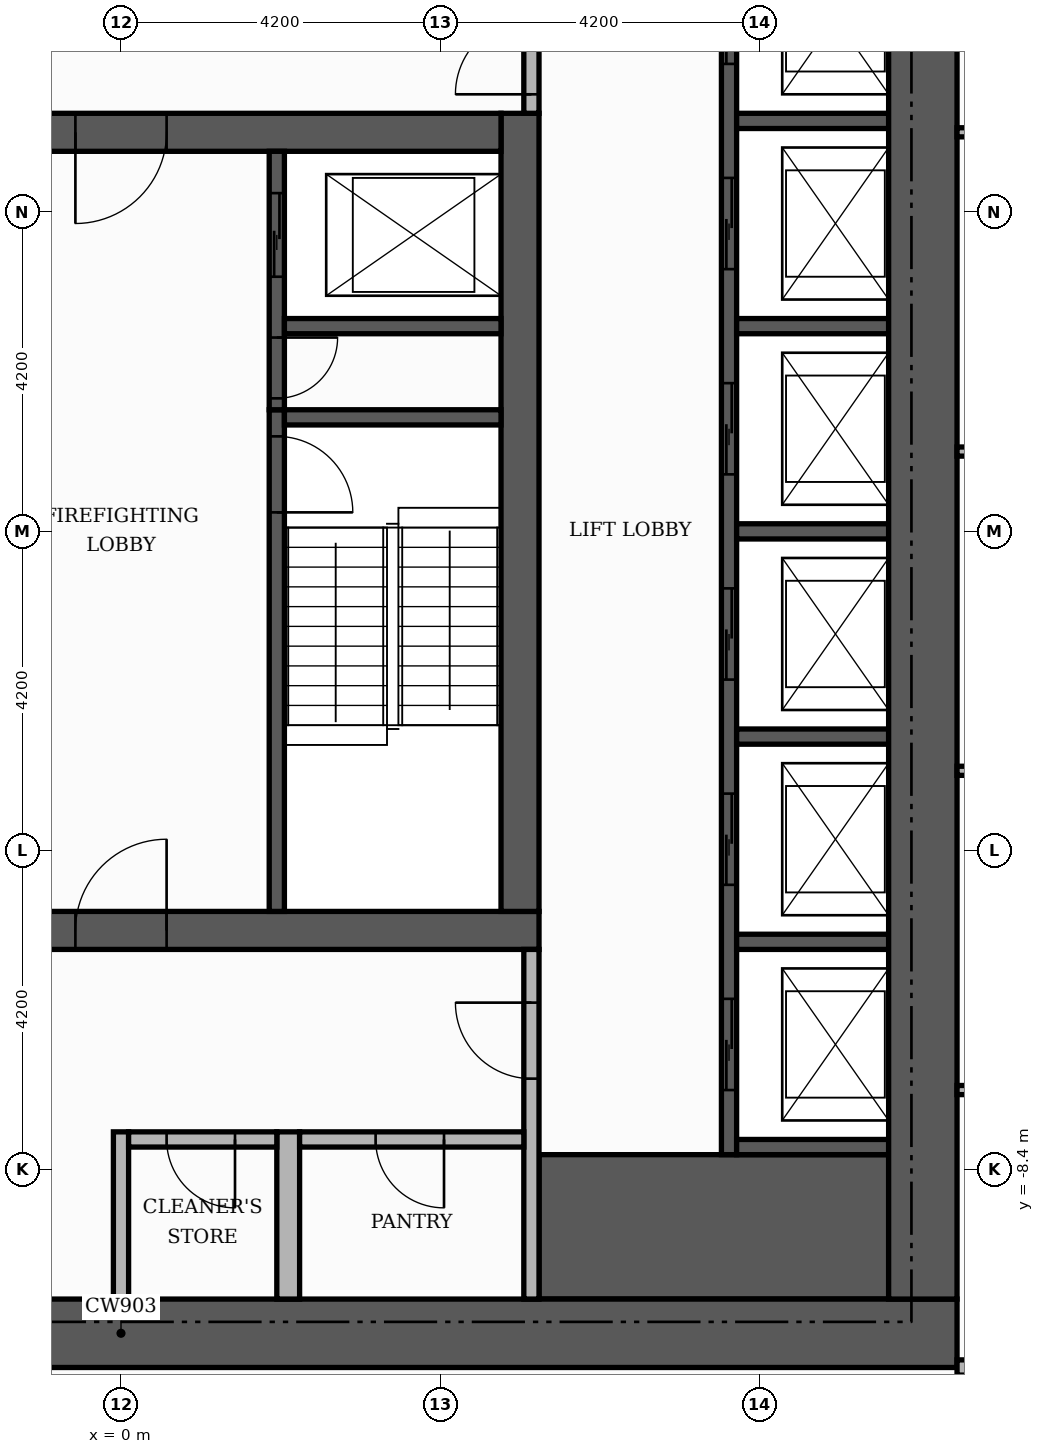
"""IFC4 building model, lengths in metres.
Left out: names, types, materials, properties, quantities, classifications, styles, units other than length and angle.
Written with IfcOpenShell. Run it as: python <this file> out.ifc"""

import sys

from ifc_helpers import new_model, si_unit, direction, frame, frame_2d, origin, place, context, subcontext, project, spatial, rectangle, extrude, element, fill, save


model = new_model("IFC4")
c1 = context("Model", 3, precision=1e-05, world=origin(), true_north=direction((0.0, 1.0)))
c2 = subcontext(c1, "Body", "Model", "MODEL_VIEW")
j1 = project(units=[si_unit("LENGTHUNIT", "METRE"), si_unit("PLANEANGLEUNIT", "RADIAN")], contexts=[c1])
p1 = place(None, origin())
s1 = spatial("IfcSite", under=j1, at=p1, CompositionType="ELEMENT")
p2 = place(p1, origin())
s2 = spatial("IfcBuilding", under=s1, at=p2, CompositionType="ELEMENT")
p3 = place(p2, frame((0.0, 0.0, 145.5)))
s3 = spatial("IfcBuildingStorey", under=s2, at=p3, CompositionType="ELEMENT", Elevation=145.5)
p4 = place(p3, frame((-5.5, -5.25, 0.0), z_axis=(0.0, 0.0, 1.0), x_axis=(1.0, 0.0, 0.0)))
e1 = element("IfcWall", 1, at=p4, inside=s3, PredefinedType="SHEAR", context=c2, shape_type="SweptSolid", body=[
    extrude(rectangle(XDim=11.0, YDim=0.5, at=frame_2d((5.5, 0.0))), origin(), (0.0, 0.0, 1.0), 3.48),
])
p5 = place(p4, frame((4.9, 0.0, 0.0)))
e2 = element("IfcOpeningElement", 2, at=p5, cuts=e1, PredefinedType="OPENING", context=c2, shape_type="SweptSolid", body=[
    extrude(rectangle(XDim=1.2, YDim=2.1, at=frame_2d((0.6, 1.05))), frame((0.0, 0.26, 0.0), z_axis=(0.0, -1.0, 0.0), x_axis=(1.0, 0.0, 0.0)), (0.0, 0.0, 1.0), 0.52),
])
p6 = place(p3, frame((5.25, -5.0, 0.0), z_axis=(0.0, 0.0, 1.0), x_axis=(0.0, 1.0, 0.0)))
e3 = element("IfcWall", 3, at=p6, inside=s3, PredefinedType="SHEAR", context=c2, shape_type="SweptSolid", body=[
    extrude(rectangle(XDim=10.5, YDim=0.5, at=frame_2d((5.25, 0.0))), origin(), (0.0, 0.0, 1.0), 3.48),
])
p7 = place(p3, frame((-5.0, 5.25, 0.0), z_axis=(0.0, 0.0, 1.0), x_axis=(1.0, 0.0, 0.0)))
e4 = element("IfcWall", 4, at=p7, inside=s3, PredefinedType="SHEAR", context=c2, shape_type="SweptSolid", body=[
    extrude(rectangle(XDim=10.0, YDim=0.5, at=frame_2d((5.0, 0.0))), origin(), (0.0, 0.0, 1.0), 3.48),
])
p8 = place(p7, frame((4.4, 0.0, 0.0)))
e5 = element("IfcOpeningElement", 5, at=p8, cuts=e4, PredefinedType="OPENING", context=c2, shape_type="SweptSolid", body=[
    extrude(rectangle(XDim=1.2, YDim=2.1, at=frame_2d((0.6, 1.05))), frame((0.0, 0.26, 0.0), z_axis=(0.0, -1.0, 0.0), x_axis=(1.0, 0.0, 0.0)), (0.0, 0.0, 1.0), 0.52),
])
p9 = place(p3, frame((5.5, -9.15, 0.0), z_axis=(0.0, 0.0, 1.0), x_axis=(1.0, 0.0, 0.0)))
e6 = element("IfcWall", 6, at=p9, inside=s3, PredefinedType="SHEAR", context=c2, shape_type="SweptSolid", body=[
    extrude(rectangle(XDim=4.6, YDim=1.9, at=frame_2d((2.3, 0.0))), origin(), (0.0, 0.0, 1.0), 3.48),
])
p10 = place(p3, frame((2.05, -5.0, 0.0), z_axis=(0.0, 0.0, 1.0), x_axis=(0.0, 1.0, 0.0)))
e7 = element("IfcWall", 7, at=p10, inside=s3, PredefinedType="SHEAR", context=c2, shape_type="SweptSolid", body=[
    extrude(rectangle(XDim=6.6, YDim=0.2, at=frame_2d((3.3, 0.0))), origin(), (0.0, 0.0, 1.0), 3.48),
])
p11 = place(p10, frame((5.25, 0.0, 0.0)))
e8 = element("IfcOpeningElement", 8, at=p11, cuts=e7, PredefinedType="OPENING", context=c2, shape_type="SweptSolid", body=[
    extrude(rectangle(XDim=1.0, YDim=2.1, at=frame_2d((0.5, 1.05))), frame((0.0, 0.11, 0.0), z_axis=(0.0, -1.0, 0.0), x_axis=(1.0, 0.0, 0.0)), (0.0, 0.0, 1.0), 0.22),
])
p12 = place(p3, frame((2.15, 1.5, 0.0), z_axis=(0.0, 0.0, 1.0), x_axis=(1.0, 0.0, 0.0)))
e9 = element("IfcWall", 9, at=p12, inside=s3, PredefinedType="SHEAR", context=c2, shape_type="SweptSolid", body=[
    extrude(rectangle(XDim=2.85, YDim=0.2, at=frame_2d((1.425, 0.0))), origin(), (0.0, 0.0, 1.0), 3.48),
])
p13 = place(p3, frame((8.0, -8.2, 0.0), z_axis=(0.0, 0.0, 1.0), x_axis=(0.0, 1.0, 0.0)))
e10 = element("IfcWall", 10, at=p13, inside=s3, PredefinedType="SHEAR", context=c2, shape_type="SweptSolid", body=[
    extrude(rectangle(XDim=16.4, YDim=0.2, at=frame_2d((8.2, 0.0))), origin(), (0.0, 0.0, 1.0), 3.48),
])
p14 = place(p13, frame((0.85, 0.0, 0.0)))
e11 = element("IfcOpeningElement", 11, at=p14, cuts=e10, PredefinedType="OPENING", context=c2, shape_type="SweptSolid", body=[
    extrude(rectangle(XDim=1.2, YDim=2.1, at=frame_2d((0.6, 1.05))), frame((0.0, 0.11, 0.0), z_axis=(0.0, -1.0, 0.0), x_axis=(1.0, 0.0, 0.0)), (0.0, 0.0, 1.0), 0.22),
])
p15 = place(p13, frame((3.55, 0.0, 0.0)))
e12 = element("IfcOpeningElement", 12, at=p15, cuts=e10, PredefinedType="OPENING", context=c2, shape_type="SweptSolid", body=[
    extrude(rectangle(XDim=1.2, YDim=2.1, at=frame_2d((0.6, 1.05))), frame((0.0, 0.11, 0.0), z_axis=(0.0, -1.0, 0.0), x_axis=(1.0, 0.0, 0.0)), (0.0, 0.0, 1.0), 0.22),
])
p16 = place(p13, frame((6.25, 0.0, 0.0)))
e13 = element("IfcOpeningElement", 13, at=p16, cuts=e10, PredefinedType="OPENING", context=c2, shape_type="SweptSolid", body=[
    extrude(rectangle(XDim=1.2, YDim=2.1, at=frame_2d((0.6, 1.05))), frame((0.0, 0.11, 0.0), z_axis=(0.0, -1.0, 0.0), x_axis=(1.0, 0.0, 0.0)), (0.0, 0.0, 1.0), 0.22),
])
p17 = place(p13, frame((8.95, 0.0, 0.0)))
e14 = element("IfcOpeningElement", 14, at=p17, cuts=e10, PredefinedType="OPENING", context=c2, shape_type="SweptSolid", body=[
    extrude(rectangle(XDim=1.2, YDim=2.1, at=frame_2d((0.6, 1.05))), frame((0.0, 0.11, 0.0), z_axis=(0.0, -1.0, 0.0), x_axis=(1.0, 0.0, 0.0)), (0.0, 0.0, 1.0), 0.22),
])
p18 = place(p13, frame((11.65, 0.0, 0.0)))
e15 = element("IfcOpeningElement", 15, at=p18, cuts=e10, PredefinedType="OPENING", context=c2, shape_type="SweptSolid", body=[
    extrude(rectangle(XDim=1.2, YDim=2.1, at=frame_2d((0.6, 1.05))), frame((0.0, 0.11, 0.0), z_axis=(0.0, -1.0, 0.0), x_axis=(1.0, 0.0, 0.0)), (0.0, 0.0, 1.0), 0.22),
])
p19 = place(p13, frame((14.35, 0.0, 0.0)))
e16 = element("IfcOpeningElement", 16, at=p19, cuts=e10, PredefinedType="OPENING", context=c2, shape_type="SweptSolid", body=[
    extrude(rectangle(XDim=1.2, YDim=2.1, at=frame_2d((0.6, 1.05))), frame((0.0, 0.11, 0.0), z_axis=(0.0, -1.0, 0.0), x_axis=(1.0, 0.0, 0.0)), (0.0, 0.0, 1.0), 0.22),
])
for number, where, z_axis, x_axis in (
    (17, (8.1, -8.1, 0.0), (0.0, 0.0, 1.0), (1.0, 0.0, 0.0)),
    (18, (8.1, -5.4, 0.0), (0.0, 0.0, 1.0), (1.0, 0.0, 0.0)),
    (19, (8.1, -2.7, 0.0), (0.0, 0.0, 1.0), (1.0, 0.0, 0.0)),
    (20, (8.1, 0.0, 0.0), (0.0, 0.0, 1.0), (1.0, 0.0, 0.0)),
):
    element("IfcWall", number, at=place(p3, frame(where, z_axis=z_axis, x_axis=x_axis)), inside=s3, PredefinedType="SHEAR", context=c2, shape_type="SweptSolid", body=[
        extrude(rectangle(XDim=2.0, YDim=0.2, at=frame_2d((1.0, 0.0))), origin(), (0.0, 0.0, 1.0), 3.48),
    ])
p20 = place(p3, frame((2.05, 1.6, 0.0), z_axis=(0.0, 0.0, 1.0), x_axis=(0.0, 1.0, 0.0)))
e21 = element("IfcWall", 21, at=p20, inside=s3, PredefinedType="SHEAR", context=c2, shape_type="SweptSolid", body=[
    extrude(rectangle(XDim=3.4, YDim=0.2, at=frame_2d((1.7, 0.0))), origin(), (0.0, 0.0, 1.0), 3.48),
])
p21 = place(p20, frame((1.75, 0.0, 0.0)))
e22 = element("IfcOpeningElement", 22, at=p21, cuts=e21, PredefinedType="OPENING", context=c2, shape_type="SweptSolid", body=[
    extrude(rectangle(XDim=1.1, YDim=2.1, at=frame_2d((0.55, 1.05))), frame((0.0, 0.11, 0.0), z_axis=(0.0, -1.0, 0.0), x_axis=(1.0, 0.0, 0.0)), (0.0, 0.0, 1.0), 0.22),
])
p22 = place(p20, frame((0.15, 0.0, 0.0)))
e23 = element("IfcOpeningElement", 23, at=p22, cuts=e21, PredefinedType="OPENING", context=c2, shape_type="SweptSolid", body=[
    extrude(rectangle(XDim=0.8, YDim=2.1, at=frame_2d((0.4, 1.05))), frame((0.0, 0.11, 0.0), z_axis=(0.0, -1.0, 0.0), x_axis=(1.0, 0.0, 0.0)), (0.0, 0.0, 1.0), 0.22),
])
p23 = place(p3, frame((2.15, 2.7, 0.0), z_axis=(0.0, 0.0, 1.0), x_axis=(1.0, 0.0, 0.0)))
e24 = element("IfcWall", 24, at=p23, inside=s3, PredefinedType="SHEAR", context=c2, shape_type="SweptSolid", body=[
    extrude(rectangle(XDim=2.85, YDim=0.2, at=frame_2d((1.425, 0.0))), origin(), (0.0, 0.0, 1.0), 3.48),
])
for number, where, z_axis, x_axis in (
    (25, (8.1, 2.7, 0.0), (0.0, 0.0, 1.0), (1.0, 0.0, 0.0)),
    (26, (8.1, 5.4, 0.0), (0.0, 0.0, 1.0), (1.0, 0.0, 0.0)),
):
    element("IfcWall", number, at=place(p3, frame(where, z_axis=z_axis, x_axis=x_axis)), inside=s3, PredefinedType="SHEAR", context=c2, shape_type="SweptSolid", body=[
        extrude(rectangle(XDim=2.0, YDim=0.2, at=frame_2d((1.0, 0.0))), origin(), (0.0, 0.0, 1.0), 3.48),
    ])
p24 = place(p3, frame((-11.0, -10.55, 0.0), z_axis=(0.0, 0.0, 1.0), x_axis=(1.0, 0.0, 0.0)))
e27 = element("IfcWall", 27, at=p24, inside=s3, PredefinedType="SHEAR", context=c2, shape_type="SweptSolid", body=[
    extrude(rectangle(XDim=22.0, YDim=0.9, at=frame_2d((11.0, 0.0))), origin(), (0.0, 0.0, 1.0), 3.48),
])
p25 = place(p24, frame((7.4, 0.0, 0.0)))
e28 = element("IfcOpeningElement", 28, at=p25, cuts=e27, PredefinedType="OPENING", context=c2, shape_type="SweptSolid", body=[
    extrude(rectangle(XDim=1.8, YDim=2.2, at=frame_2d((0.9, 1.1))), frame((0.0, 0.46, 0.0), z_axis=(0.0, -1.0, 0.0), x_axis=(1.0, 0.0, 0.0)), (0.0, 0.0, 1.0), 0.92),
])
p26 = place(p3, frame((10.55, -10.1, 0.0), z_axis=(0.0, 0.0, 1.0), x_axis=(0.0, 1.0, 0.0)))
e29 = element("IfcWall", 29, at=p26, inside=s3, PredefinedType="SHEAR", context=c2, shape_type="SweptSolid", body=[
    extrude(rectangle(XDim=20.2, YDim=0.9, at=frame_2d((10.1, 0.0))), origin(), (0.0, 0.0, 1.0), 3.48),
])
p27 = place(p3, frame((0.0, -10.1, 0.0), z_axis=(0.0, 0.0, 1.0), x_axis=(0.0, 1.0, 0.0)))
e30 = element("IfcWall", 30, at=p27, inside=s3, PredefinedType="PARTITIONING", context=c2, shape_type="SweptSolid", body=[
    extrude(rectangle(XDim=2.2, YDim=0.2, at=frame_2d((1.1, 0.0))), origin(), (0.0, 0.0, 1.0), 3.48),
])
p28 = place(p3, frame((2.2, -10.1, 0.0), z_axis=(0.0, 0.0, 1.0), x_axis=(0.0, 1.0, 0.0)))
e31 = element("IfcWall", 31, at=p28, inside=s3, PredefinedType="PARTITIONING", context=c2, shape_type="SweptSolid", body=[
    extrude(rectangle(XDim=2.2, YDim=0.3, at=frame_2d((1.1, 0.0))), origin(), (0.0, 0.0, 1.0), 3.48),
])
p29 = place(p3, frame((5.4, -10.1, 0.0), z_axis=(0.0, 0.0, 1.0), x_axis=(0.0, 1.0, 0.0)))
e32 = element("IfcWall", 32, at=p29, inside=s3, PredefinedType="PARTITIONING", context=c2, shape_type="SweptSolid", body=[
    extrude(rectangle(XDim=4.6, YDim=0.2, at=frame_2d((2.3, 0.0))), origin(), (0.0, 0.0, 1.0), 3.48),
])
p30 = place(p29, frame((2.9, 0.0, 0.0)))
e33 = element("IfcOpeningElement", 33, at=p30, cuts=e32, PredefinedType="OPENING", context=c2, shape_type="SweptSolid", body=[
    extrude(rectangle(XDim=1.0, YDim=2.1, at=frame_2d((0.5, 1.05))), frame((0.0, 0.11, 0.0), z_axis=(0.0, -1.0, 0.0), x_axis=(1.0, 0.0, 0.0)), (0.0, 0.0, 1.0), 0.22),
])
p31 = place(p3, frame((0.1, -8.0, 0.0), z_axis=(0.0, 0.0, 1.0), x_axis=(1.0, 0.0, 0.0)))
e34 = element("IfcWall", 34, at=p31, inside=s3, PredefinedType="PARTITIONING", context=c2, shape_type="SweptSolid", body=[
    extrude(rectangle(XDim=1.95, YDim=0.2, at=frame_2d((0.975, 0.0))), origin(), (0.0, 0.0, 1.0), 3.48),
])
p32 = place(p31, frame((0.5, 0.0, 0.0)))
e35 = element("IfcOpeningElement", 35, at=p32, cuts=e34, PredefinedType="OPENING", context=c2, shape_type="SweptSolid", body=[
    extrude(rectangle(XDim=0.9, YDim=2.1, at=frame_2d((0.45, 1.05))), frame((0.0, 0.11, 0.0), z_axis=(0.0, -1.0, 0.0), x_axis=(1.0, 0.0, 0.0)), (0.0, 0.0, 1.0), 0.22),
])
p33 = place(p3, frame((2.35, -8.0, 0.0), z_axis=(0.0, 0.0, 1.0), x_axis=(1.0, 0.0, 0.0)))
e36 = element("IfcWall", 36, at=p33, inside=s3, PredefinedType="PARTITIONING", context=c2, shape_type="SweptSolid", body=[
    extrude(rectangle(XDim=2.95, YDim=0.2, at=frame_2d((1.475, 0.0))), origin(), (0.0, 0.0, 1.0), 3.48),
])
p34 = place(p33, frame((1.0, 0.0, 0.0)))
e37 = element("IfcOpeningElement", 37, at=p34, cuts=e36, PredefinedType="OPENING", context=c2, shape_type="SweptSolid", body=[
    extrude(rectangle(XDim=0.9, YDim=2.1, at=frame_2d((0.45, 1.05))), frame((0.0, 0.11, 0.0), z_axis=(0.0, -1.0, 0.0), x_axis=(1.0, 0.0, 0.0)), (0.0, 0.0, 1.0), 0.22),
])
p35 = place(p3, frame((5.4, 5.5, 0.0), z_axis=(0.0, 0.0, 1.0), x_axis=(0.0, 1.0, 0.0)))
e38 = element("IfcWall", 38, at=p35, inside=s3, PredefinedType="PARTITIONING", context=c2, shape_type="SweptSolid", body=[
    extrude(rectangle(XDim=4.6, YDim=0.2, at=frame_2d((2.3, 0.0))), origin(), (0.0, 0.0, 1.0), 3.48),
])
p36 = place(p35, frame((0.25, 0.0, 0.0)))
e39 = element("IfcOpeningElement", 39, at=p36, cuts=e38, PredefinedType="OPENING", context=c2, shape_type="SweptSolid", body=[
    extrude(rectangle(XDim=1.0, YDim=2.1, at=frame_2d((0.5, 1.05))), frame((0.0, 0.11, 0.0), z_axis=(0.0, -1.0, 0.0), x_axis=(1.0, 0.0, 0.0)), (0.0, 0.0, 1.0), 0.22),
])
p37 = place(p3, frame((11.0, -11.0, 0.0), z_axis=(0.0, 0.0, 1.0), x_axis=(1.0, 0.0, 0.0)))
e40 = element("IfcWall", 40, at=p37, inside=s3, PredefinedType="PARTITIONING", context=c2, shape_type="SweptSolid", body=[
    extrude(rectangle(XDim=2.65, YDim=0.2, at=frame_2d((1.325, 0.0))), origin(), (0.0, 0.0, 1.0), 3.48),
])
p38 = place(p37, frame((0.775, 0.0, 0.0)))
e41 = element("IfcOpeningElement", 41, at=p38, cuts=e40, PredefinedType="OPENING", context=c2, shape_type="SweptSolid", body=[
    extrude(rectangle(XDim=1.1, YDim=2.4, at=frame_2d((0.55, 1.2))), frame((0.0, 0.11, 0.0), z_axis=(0.0, -1.0, 0.0), x_axis=(1.0, 0.0, 0.0)), (0.0, 0.0, 1.0), 0.22),
])
p39 = place(p3, frame((11.0, -7.35, 0.0), z_axis=(0.0, 0.0, 1.0), x_axis=(1.0, 0.0, 0.0)))
e42 = element("IfcWall", 42, at=p39, inside=s3, PredefinedType="PARTITIONING", context=c2, shape_type="SweptSolid", body=[
    extrude(rectangle(XDim=7.92, YDim=0.12, at=frame_2d((3.96, 0.0))), origin(), (0.0, 0.0, 1.0), 3.48),
])
p40 = place(p39, frame((3.51, 0.0, 0.0)))
e43 = element("IfcOpeningElement", 43, at=p40, cuts=e42, PredefinedType="OPENING", context=c2, shape_type="SweptSolid", body=[
    extrude(rectangle(XDim=0.9, YDim=2.1, at=frame_2d((0.45, 1.05))), frame((0.0, 0.07, 0.0), z_axis=(0.0, -1.0, 0.0), x_axis=(1.0, 0.0, 0.0)), (0.0, 0.0, 1.0), 0.14),
])
for number, where, z_axis, x_axis in (
    (44, (11.0, -3.15, 0.0), (0.0, 0.0, 1.0), (1.0, 0.0, 0.0)),
    (45, (11.0, 1.05, 0.0), (0.0, 0.0, 1.0), (1.0, 0.0, 0.0)),
    (46, (11.0, 5.25, 0.0), (0.0, 0.0, 1.0), (1.0, 0.0, 0.0)),
):
    element("IfcWall", number, at=place(p3, frame(where, z_axis=z_axis, x_axis=x_axis)), inside=s3, PredefinedType="PARTITIONING", context=c2, shape_type="SweptSolid", body=[
        extrude(rectangle(XDim=7.92, YDim=0.12, at=frame_2d((3.96, 0.0))), origin(), (0.0, 0.0, 1.0), 3.48),
    ])
p41 = place(p14, origin())
e47 = element("IfcDoor", 47, at=p41, inside=s3, OperationType="SLIDING_TO_LEFT", PredefinedType="DOOR", context=c2, shape_type="SweptSolid", body=[
    extrude(rectangle(XDim=1.2, YDim=2.1, at=frame_2d((0.6, 1.05))), frame((0.0, 0.025, 0.0), z_axis=(0.0, -1.0, 0.0), x_axis=(1.0, 0.0, 0.0)), (0.0, 0.0, 1.0), 0.05),
])
fill(e11, e47)
p42 = place(p15, origin())
e48 = element("IfcDoor", 48, at=p42, inside=s3, OperationType="SLIDING_TO_LEFT", PredefinedType="DOOR", context=c2, shape_type="SweptSolid", body=[
    extrude(rectangle(XDim=1.2, YDim=2.1, at=frame_2d((0.6, 1.05))), frame((0.0, 0.025, 0.0), z_axis=(0.0, -1.0, 0.0), x_axis=(1.0, 0.0, 0.0)), (0.0, 0.0, 1.0), 0.05),
])
fill(e12, e48)
p43 = place(p16, origin())
e49 = element("IfcDoor", 49, at=p43, inside=s3, OperationType="SLIDING_TO_LEFT", PredefinedType="DOOR", context=c2, shape_type="SweptSolid", body=[
    extrude(rectangle(XDim=1.2, YDim=2.1, at=frame_2d((0.6, 1.05))), frame((0.0, 0.025, 0.0), z_axis=(0.0, -1.0, 0.0), x_axis=(1.0, 0.0, 0.0)), (0.0, 0.0, 1.0), 0.05),
])
fill(e13, e49)
p44 = place(p17, origin())
e50 = element("IfcDoor", 50, at=p44, inside=s3, OperationType="SLIDING_TO_LEFT", PredefinedType="DOOR", context=c2, shape_type="SweptSolid", body=[
    extrude(rectangle(XDim=1.2, YDim=2.1, at=frame_2d((0.6, 1.05))), frame((0.0, 0.025, 0.0), z_axis=(0.0, -1.0, 0.0), x_axis=(1.0, 0.0, 0.0)), (0.0, 0.0, 1.0), 0.05),
])
fill(e14, e50)
p45 = place(p18, origin())
e51 = element("IfcDoor", 51, at=p45, inside=s3, OperationType="SLIDING_TO_LEFT", PredefinedType="DOOR", context=c2, shape_type="SweptSolid", body=[
    extrude(rectangle(XDim=1.2, YDim=2.1, at=frame_2d((0.6, 1.05))), frame((0.0, 0.025, 0.0), z_axis=(0.0, -1.0, 0.0), x_axis=(1.0, 0.0, 0.0)), (0.0, 0.0, 1.0), 0.05),
])
fill(e15, e51)
p46 = place(p19, origin())
e52 = element("IfcDoor", 52, at=p46, inside=s3, OperationType="SLIDING_TO_LEFT", PredefinedType="DOOR", context=c2, shape_type="SweptSolid", body=[
    extrude(rectangle(XDim=1.2, YDim=2.1, at=frame_2d((0.6, 1.05))), frame((0.0, 0.025, 0.0), z_axis=(0.0, -1.0, 0.0), x_axis=(1.0, 0.0, 0.0)), (0.0, 0.0, 1.0), 0.05),
])
fill(e16, e52)
p47 = place(p21, origin())
e53 = element("IfcDoor", 53, at=p47, inside=s3, OperationType="SLIDING_TO_LEFT", PredefinedType="DOOR", context=c2, shape_type="SweptSolid", body=[
    extrude(rectangle(XDim=1.1, YDim=2.1, at=frame_2d((0.55, 1.05))), frame((0.0, 0.025, 0.0), z_axis=(0.0, -1.0, 0.0), x_axis=(1.0, 0.0, 0.0)), (0.0, 0.0, 1.0), 0.05),
])
fill(e22, e53)
p48 = place(p11, frame((1.0, 0.0, 0.0), z_axis=(0.0, 0.0, 1.0), x_axis=(-1.0, 0.0, 0.0)))
e54 = element("IfcDoor", 54, at=p48, inside=s3, OperationType="SINGLE_SWING_LEFT", PredefinedType="DOOR", context=c2, shape_type="SweptSolid", body=[
    extrude(rectangle(XDim=1.0, YDim=2.1, at=frame_2d((0.5, 1.05))), frame((0.0, 0.025, 0.0), z_axis=(0.0, -1.0, 0.0), x_axis=(1.0, 0.0, 0.0)), (0.0, 0.0, 1.0), 0.05),
])
fill(e8, e54)
p49 = place(p22, frame((0.8, 0.0, 0.0), z_axis=(0.0, 0.0, 1.0), x_axis=(-1.0, 0.0, 0.0)))
e55 = element("IfcDoor", 55, at=p49, inside=s3, OperationType="SINGLE_SWING_RIGHT", PredefinedType="DOOR", context=c2, shape_type="SweptSolid", body=[
    extrude(rectangle(XDim=0.8, YDim=2.1, at=frame_2d((0.4, 1.05))), frame((0.0, 0.025, 0.0), z_axis=(0.0, -1.0, 0.0), x_axis=(1.0, 0.0, 0.0)), (0.0, 0.0, 1.0), 0.05),
])
fill(e23, e55)
p50 = place(p8, frame((1.2, 0.0, 0.0), z_axis=(0.0, 0.0, 1.0), x_axis=(-1.0, 0.0, 0.0)))
e56 = element("IfcDoor", 56, at=p50, inside=s3, OperationType="SINGLE_SWING_LEFT", PredefinedType="DOOR", context=c2, shape_type="SweptSolid", body=[
    extrude(rectangle(XDim=1.2, YDim=2.1, at=frame_2d((0.6, 1.05))), frame((0.0, 0.025, 0.0), z_axis=(0.0, -1.0, 0.0), x_axis=(1.0, 0.0, 0.0)), (0.0, 0.0, 1.0), 0.05),
])
fill(e5, e56)
p51 = place(p5, origin())
e57 = element("IfcDoor", 57, at=p51, inside=s3, OperationType="SINGLE_SWING_RIGHT", PredefinedType="DOOR", context=c2, shape_type="SweptSolid", body=[
    extrude(rectangle(XDim=1.2, YDim=2.1, at=frame_2d((0.6, 1.05))), frame((0.0, 0.025, 0.0), z_axis=(0.0, -1.0, 0.0), x_axis=(1.0, 0.0, 0.0)), (0.0, 0.0, 1.0), 0.05),
])
fill(e2, e57)
p52 = place(p36, origin())
e58 = element("IfcDoor", 58, at=p52, inside=s3, OperationType="SINGLE_SWING_LEFT", PredefinedType="DOOR", context=c2, shape_type="SweptSolid", body=[
    extrude(rectangle(XDim=1.0, YDim=2.1, at=frame_2d((0.5, 1.05))), frame((0.0, 0.025, 0.0), z_axis=(0.0, -1.0, 0.0), x_axis=(1.0, 0.0, 0.0)), (0.0, 0.0, 1.0), 0.05),
])
fill(e39, e58)
p53 = place(p30, origin())
e59 = element("IfcDoor", 59, at=p53, inside=s3, OperationType="SINGLE_SWING_RIGHT", PredefinedType="DOOR", context=c2, shape_type="SweptSolid", body=[
    extrude(rectangle(XDim=1.0, YDim=2.1, at=frame_2d((0.5, 1.05))), frame((0.0, 0.025, 0.0), z_axis=(0.0, -1.0, 0.0), x_axis=(1.0, 0.0, 0.0)), (0.0, 0.0, 1.0), 0.05),
])
fill(e33, e59)
p54 = place(p32, frame((0.9, 0.0, 0.0), z_axis=(0.0, 0.0, 1.0), x_axis=(-1.0, 0.0, 0.0)))
e60 = element("IfcDoor", 60, at=p54, inside=s3, OperationType="SINGLE_SWING_RIGHT", PredefinedType="DOOR", context=c2, shape_type="SweptSolid", body=[
    extrude(rectangle(XDim=0.9, YDim=2.1, at=frame_2d((0.45, 1.05))), frame((0.0, 0.025, 0.0), z_axis=(0.0, -1.0, 0.0), x_axis=(1.0, 0.0, 0.0)), (0.0, 0.0, 1.0), 0.05),
])
fill(e35, e60)
p55 = place(p34, frame((0.9, 0.0, 0.0), z_axis=(0.0, 0.0, 1.0), x_axis=(-1.0, 0.0, 0.0)))
e61 = element("IfcDoor", 61, at=p55, inside=s3, OperationType="SINGLE_SWING_RIGHT", PredefinedType="DOOR", context=c2, shape_type="SweptSolid", body=[
    extrude(rectangle(XDim=0.9, YDim=2.1, at=frame_2d((0.45, 1.05))), frame((0.0, 0.025, 0.0), z_axis=(0.0, -1.0, 0.0), x_axis=(1.0, 0.0, 0.0)), (0.0, 0.0, 1.0), 0.05),
])
fill(e37, e61)
save(model, sys.argv[1])
